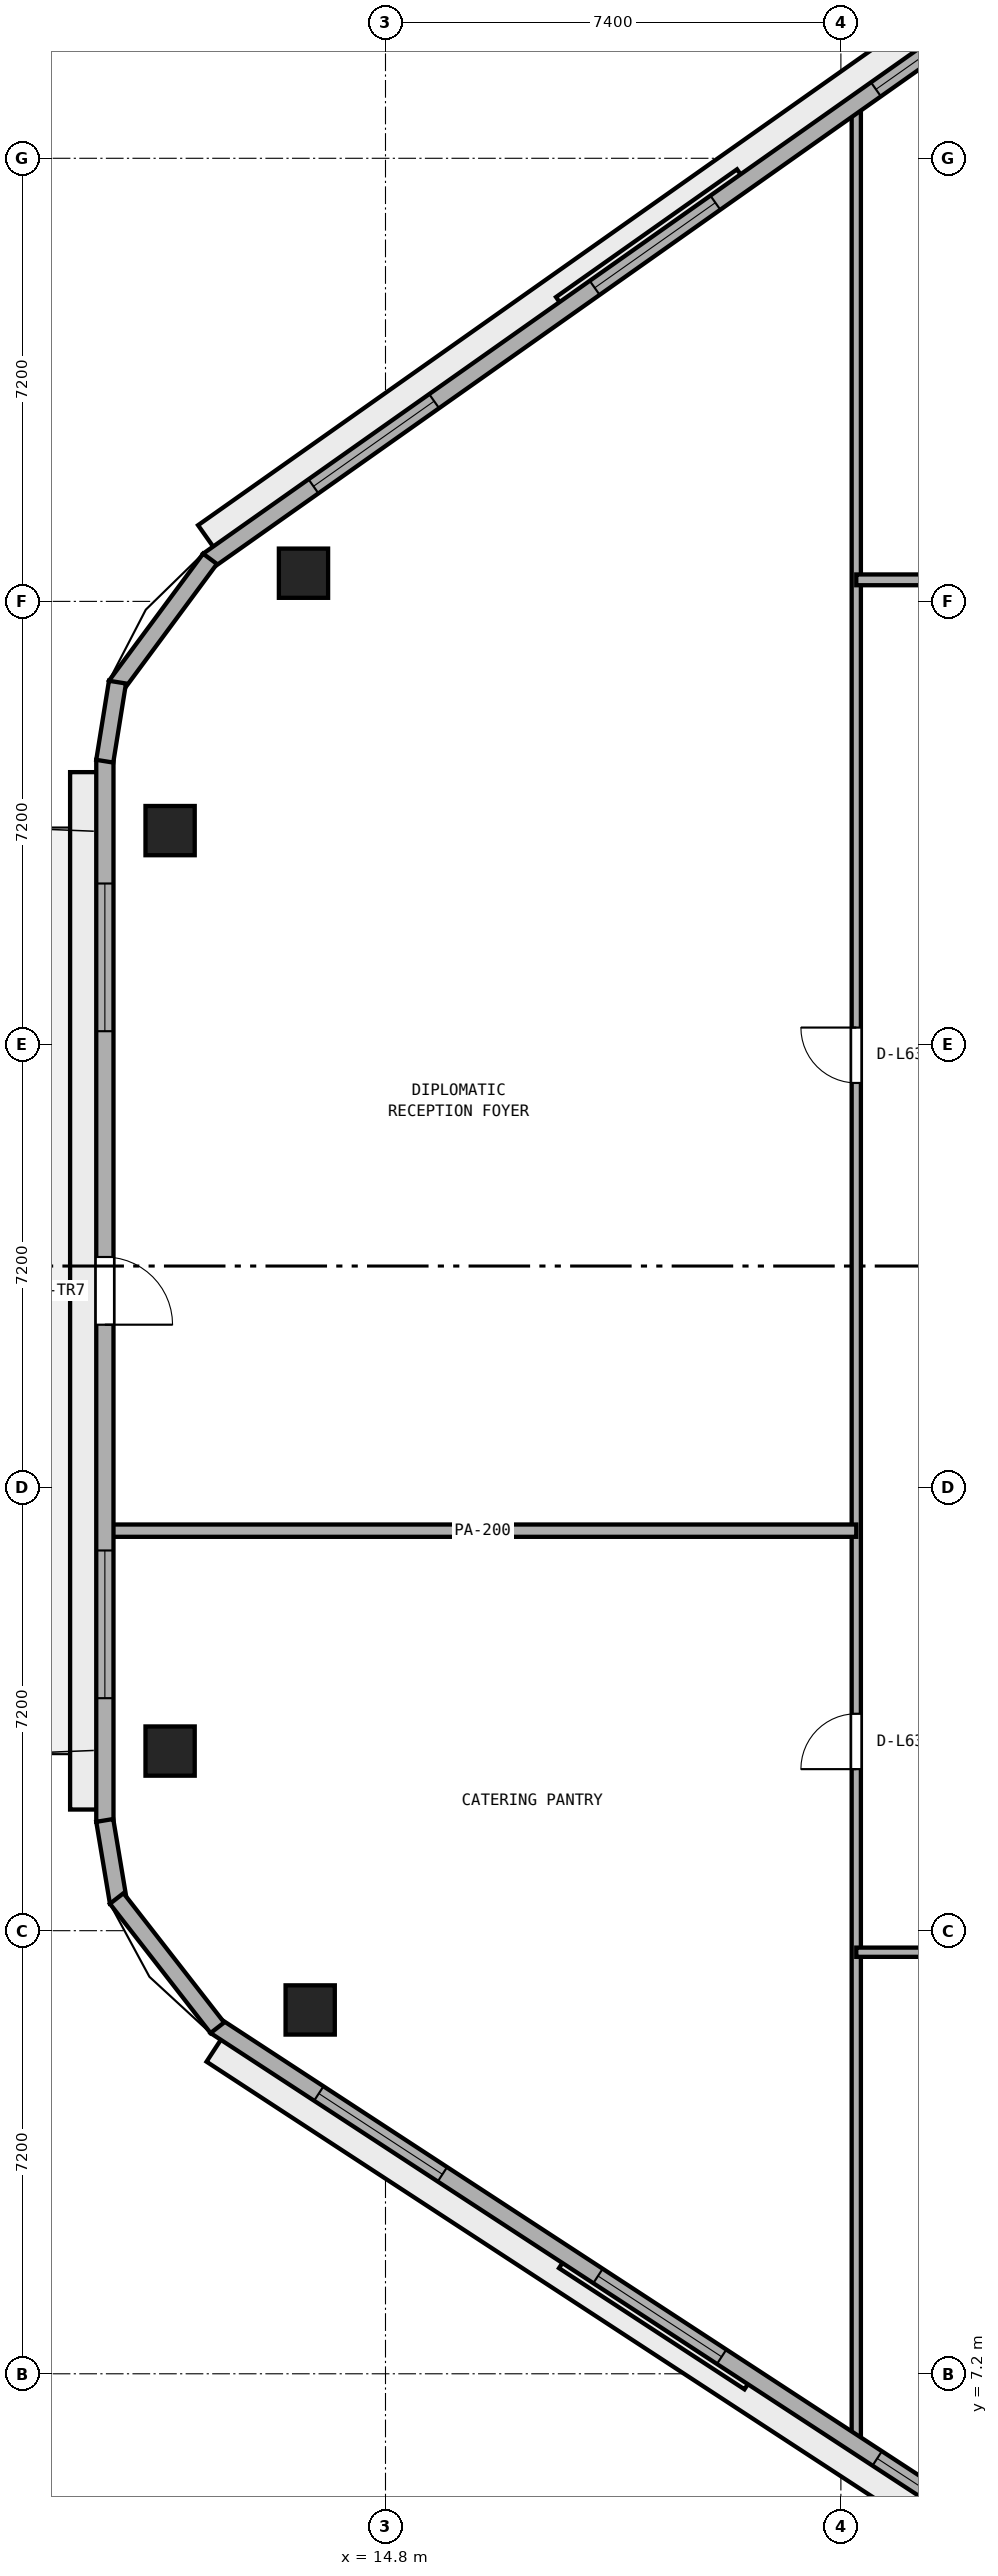
"""IFC4 building model, lengths in metres.
Left out: names, types, materials, properties, quantities, classifications, styles, units other than length and angle.
Written with IfcOpenShell. Run it as: python <this file> out.ifc"""

import sys

from ifc_helpers import new_model, si_unit, direction, frame, frame_2d, origin, origin_2d, place, context, subcontext, project, spatial, rectangle, extrude, element, fill, save


model = new_model("IFC4")
c1 = context("Model", 3, precision=1e-05, world=origin(), true_north=direction((0.0, 1.0)))
c2 = subcontext(c1, "Body", "Model", "MODEL_VIEW")
j1 = project(units=[si_unit("LENGTHUNIT", "METRE"), si_unit("PLANEANGLEUNIT", "RADIAN")], contexts=[c1])
p1 = place(None, origin())
s1 = spatial("IfcSite", under=j1, at=p1, CompositionType="ELEMENT")
p2 = place(p1, origin())
s2 = spatial("IfcBuilding", under=s1, at=p2, CompositionType="ELEMENT")
p3 = place(p2, frame((0.0, 0.0, 247.8)))
s3 = spatial("IfcBuildingStorey", under=s2, at=p3, CompositionType="ELEMENT", Elevation=247.8)
for number, where, z_axis, x_axis in (
    (1, (13.467, 36.458, 0.0), (0.0, 0.0, 1.0), (1.0, 0.0, 0.0)),
    (2, (11.3, 32.275, 0.0), (0.0, 0.0, 1.0), (1.0, 0.0, 0.0)),
    (3, (11.3, 17.319, 0.0), (0.0, 0.0, 1.0), (1.0, 0.0, 0.0)),
    (4, (13.576, 13.112, 0.0), (0.0, 0.0, 1.0), (1.0, 0.0, 0.0)),
):
    element("IfcColumn", number, at=place(p3, frame(where, z_axis=z_axis, x_axis=x_axis)), inside=s3, PredefinedType="COLUMN", context=c2, shape_type="SweptSolid", body=[
        extrude(rectangle(XDim=0.8, YDim=0.8, at=origin_2d()), origin(), (0.0, 0.0, 1.0), 3.8),
    ])
p4 = place(p3, frame((22.45, 6.02, 0.0), z_axis=(0.0, 0.0, 1.0), x_axis=(0.0, 1.0, 0.0)))
e5 = element("IfcWall", 5, at=p4, inside=s3, PredefinedType="PARTITIONING", context=c2, shape_type="SweptSolid", body=[
    extrude(rectangle(XDim=38.106, YDim=0.15, at=frame_2d((19.053, 0.0))), origin(), (0.0, 0.0, 1.0), 3.51),
])
p5 = place(p4, frame((11.005, 0.0, 0.0)))
e6 = element("IfcOpeningElement", 6, at=p5, cuts=e5, PredefinedType="OPENING", context=c2, shape_type="SweptSolid", body=[
    extrude(rectangle(XDim=0.9, YDim=2.1, at=frame_2d((0.45, 1.05))), frame((0.0, 0.085, 0.0), z_axis=(0.0, -1.0, 0.0), x_axis=(1.0, 0.0, 0.0)), (0.0, 0.0, 1.0), 0.17),
])
p6 = place(p4, frame((22.155, 0.0, 0.0)))
e7 = element("IfcOpeningElement", 7, at=p6, cuts=e5, PredefinedType="OPENING", context=c2, shape_type="SweptSolid", body=[
    extrude(rectangle(XDim=0.9, YDim=2.1, at=frame_2d((0.45, 1.05))), frame((0.0, 0.085, 0.0), z_axis=(0.0, -1.0, 0.0), x_axis=(1.0, 0.0, 0.0)), (0.0, 0.0, 1.0), 0.17),
])
p7 = place(p3, frame((22.45, 14.05, 0.0), z_axis=(0.0, 0.0, 1.0), x_axis=(1.0, 0.0, 0.0)))
e8 = element("IfcWall", 8, at=p7, inside=s3, PredefinedType="PARTITIONING", context=c2, shape_type="SweptSolid", body=[
    extrude(rectangle(XDim=13.2, YDim=0.15, at=frame_2d((6.6, 0.0))), origin(), (0.0, 0.0, 1.0), 3.51),
])
p8 = place(p7, frame((6.15, 0.0, 0.0)))
e9 = element("IfcOpeningElement", 9, at=p8, cuts=e8, PredefinedType="OPENING", context=c2, shape_type="SweptSolid", body=[
    extrude(rectangle(XDim=0.9, YDim=2.1, at=frame_2d((0.45, 1.05))), frame((0.0, 0.085, 0.0), z_axis=(0.0, -1.0, 0.0), x_axis=(1.0, 0.0, 0.0)), (0.0, 0.0, 1.0), 0.17),
])
p9 = place(p3, frame((10.305, 20.9, 0.0), z_axis=(0.0, 0.0, 1.0), x_axis=(1.0, 0.0, 0.0)))
e10 = element("IfcWall", 10, at=p9, inside=s3, PredefinedType="PARTITIONING", context=c2, shape_type="SweptSolid", body=[
    extrude(rectangle(XDim=12.145, YDim=0.2, at=frame_2d((6.073, 0.0))), origin(), (0.0, 0.0, 1.0), 3.51),
])
p10 = place(p3, frame((22.45, 36.35, 0.0), z_axis=(0.0, 0.0, 1.0), x_axis=(1.0, 0.0, 0.0)))
e11 = element("IfcWall", 11, at=p10, inside=s3, PredefinedType="PARTITIONING", context=c2, shape_type="SweptSolid", body=[
    extrude(rectangle(XDim=26.15, YDim=0.175, at=frame_2d((13.075, 0.0))), origin(), (0.0, 0.0, 1.0), 3.51),
])
p11 = place(p10, frame((12.575, 0.0, 0.0)))
e12 = element("IfcOpeningElement", 12, at=p11, cuts=e11, PredefinedType="OPENING", context=c2, shape_type="SweptSolid", body=[
    extrude(rectangle(XDim=1.0, YDim=2.12, at=frame_2d((0.5, 1.06))), frame((0.0, 0.097, 0.0), z_axis=(0.0, -1.0, 0.0), x_axis=(1.0, 0.0, 0.0)), (0.0, 0.0, 1.0), 0.195),
])
p12 = place(p3, frame((26.443, 46.913, 0.0), z_axis=(0.0, 0.0, 1.0), x_axis=(-0.817024179766, -0.576603407619, 0.0)))
e13 = element("IfcWall", 13, at=p12, inside=s3, PredefinedType="STANDARD", context=c2, shape_type="SweptSolid", body=[
    extrude(rectangle(XDim=17.78, YDim=0.28, at=frame_2d((8.89, 0.0))), origin(), (0.0, 0.0, 1.0), 3.51),
])
p13 = place(p12, frame((2.097, 0.0, 0.9)))
e14 = element("IfcOpeningElement", 14, at=p13, cuts=e13, PredefinedType="OPENING", context=c2, shape_type="SweptSolid", body=[
    extrude(rectangle(XDim=2.4, YDim=1.75, at=frame_2d((1.2, 0.875))), frame((0.0, 0.15, 0.0), z_axis=(0.0, -1.0, 0.0), x_axis=(1.0, 0.0, 0.0)), (0.0, 0.0, 1.0), 0.3),
])
p14 = place(p12, frame((7.69, 0.0, 0.9)))
e15 = element("IfcOpeningElement", 15, at=p14, cuts=e13, PredefinedType="OPENING", context=c2, shape_type="SweptSolid", body=[
    extrude(rectangle(XDim=2.4, YDim=1.75, at=frame_2d((1.2, 0.875))), frame((0.0, 0.15, 0.0), z_axis=(0.0, -1.0, 0.0), x_axis=(1.0, 0.0, 0.0)), (0.0, 0.0, 1.0), 0.3),
])
p15 = place(p12, frame((13.283, 0.0, 0.9)))
e16 = element("IfcOpeningElement", 16, at=p15, cuts=e13, PredefinedType="OPENING", context=c2, shape_type="SweptSolid", body=[
    extrude(rectangle(XDim=2.4, YDim=1.75, at=frame_2d((1.2, 0.875))), frame((0.0, 0.15, 0.0), z_axis=(0.0, -1.0, 0.0), x_axis=(1.0, 0.0, 0.0)), (0.0, 0.0, 1.0), 0.3),
])
p16 = place(p3, frame((10.24, 33.425, 0.0), z_axis=(0.0, 0.0, 1.0), x_axis=(0.0, -1.0, 0.0)))
e17 = element("IfcWall", 17, at=p16, inside=s3, PredefinedType="STANDARD", context=c2, shape_type="SweptSolid", body=[
    extrude(rectangle(XDim=17.257, YDim=0.28, at=frame_2d((8.628, 0.0))), origin(), (0.0, 0.0, 1.0), 3.51),
])
p17 = place(p16, frame((8.078, 0.0, 0.0)))
e18 = element("IfcOpeningElement", 18, at=p17, cuts=e17, PredefinedType="OPENING", context=c2, shape_type="SweptSolid", body=[
    extrude(rectangle(XDim=1.1, YDim=2.2, at=frame_2d((0.55, 1.1))), frame((0.0, 0.15, 0.0), z_axis=(0.0, -1.0, 0.0), x_axis=(1.0, 0.0, 0.0)), (0.0, 0.0, 1.0), 0.3),
])
p18 = place(p16, frame((2.01, 0.0, 0.9)))
e19 = element("IfcOpeningElement", 19, at=p18, cuts=e17, PredefinedType="OPENING", context=c2, shape_type="SweptSolid", body=[
    extrude(rectangle(XDim=2.4, YDim=1.75, at=frame_2d((1.2, 0.875))), frame((0.0, 0.15, 0.0), z_axis=(0.0, -1.0, 0.0), x_axis=(1.0, 0.0, 0.0)), (0.0, 0.0, 1.0), 0.3),
])
p19 = place(p16, frame((12.847, 0.0, 0.9)))
e20 = element("IfcOpeningElement", 20, at=p19, cuts=e17, PredefinedType="OPENING", context=c2, shape_type="SweptSolid", body=[
    extrude(rectangle(XDim=2.4, YDim=1.75, at=frame_2d((1.2, 0.875))), frame((0.0, 0.15, 0.0), z_axis=(0.0, -1.0, 0.0), x_axis=(1.0, 0.0, 0.0)), (0.0, 0.0, 1.0), 0.3),
])
p20 = place(p3, frame((12.034, 12.854, 0.0), z_axis=(0.0, 0.0, 1.0), x_axis=(0.837118352984, -0.547021812269, 0.0)))
e21 = element("IfcWall", 21, at=p20, inside=s3, PredefinedType="STANDARD", context=c2, shape_type="SweptSolid", body=[
    extrude(rectangle(XDim=17.259, YDim=0.28, at=frame_2d((8.63, 0.0))), origin(), (0.0, 0.0, 1.0), 3.51),
])
p21 = place(p20, frame((2.01, 0.0, 0.9)))
e22 = element("IfcOpeningElement", 22, at=p21, cuts=e21, PredefinedType="OPENING", context=c2, shape_type="SweptSolid", body=[
    extrude(rectangle(XDim=2.4, YDim=1.75, at=frame_2d((1.2, 0.875))), frame((0.0, 0.15, 0.0), z_axis=(0.0, -1.0, 0.0), x_axis=(1.0, 0.0, 0.0)), (0.0, 0.0, 1.0), 0.3),
])
p22 = place(p20, frame((7.43, 0.0, 0.9)))
e23 = element("IfcOpeningElement", 23, at=p22, cuts=e21, PredefinedType="OPENING", context=c2, shape_type="SweptSolid", body=[
    extrude(rectangle(XDim=2.4, YDim=1.75, at=frame_2d((1.2, 0.875))), frame((0.0, 0.15, 0.0), z_axis=(0.0, -1.0, 0.0), x_axis=(1.0, 0.0, 0.0)), (0.0, 0.0, 1.0), 0.3),
])
p23 = place(p20, frame((12.849, 0.0, 0.9)))
e24 = element("IfcOpeningElement", 24, at=p23, cuts=e21, PredefinedType="OPENING", context=c2, shape_type="SweptSolid", body=[
    extrude(rectangle(XDim=2.4, YDim=1.75, at=frame_2d((1.2, 0.875))), frame((0.0, 0.15, 0.0), z_axis=(0.0, -1.0, 0.0), x_axis=(1.0, 0.0, 0.0)), (0.0, 0.0, 1.0), 0.3),
])
p24 = place(p3, frame((11.948, 36.692, 0.0), z_axis=(0.0, 0.0, 1.0), x_axis=(-0.595170751493, -0.803599263668, 0.0)))
e25 = element("IfcWall", 25, at=p24, inside=s3, PredefinedType="STANDARD", context=c2, shape_type="SweptSolid", body=[
    extrude(rectangle(XDim=2.57, YDim=0.28, at=frame_2d((1.285, 0.0))), origin(), (0.0, 0.0, 1.0), 3.51),
])
p25 = place(p3, frame((10.445, 34.688, 0.0), z_axis=(0.0, 0.0, 1.0), x_axis=(-0.158524605336, -0.987355027081, 0.0)))
e26 = element("IfcWall", 26, at=p25, inside=s3, PredefinedType="STANDARD", context=c2, shape_type="SweptSolid", body=[
    extrude(rectangle(XDim=1.301, YDim=0.28, at=frame_2d((0.651, 0.0))), origin(), (0.0, 0.0, 1.0), 3.51),
])
p26 = place(p3, frame((10.238, 16.192, 0.0), z_axis=(0.0, 0.0, 1.0), x_axis=(0.164604311367, -0.986359681191, 0.0)))
e27 = element("IfcWall", 27, at=p26, inside=s3, PredefinedType="STANDARD", context=c2, shape_type="SweptSolid", body=[
    extrude(rectangle(XDim=1.35, YDim=0.28, at=frame_2d((0.675, 0.0))), origin(), (0.0, 0.0, 1.0), 3.51),
])
p27 = place(p3, frame((10.433, 14.923, 0.0), z_axis=(0.0, 0.0, 1.0), x_axis=(0.614181852676, -0.78916452774, 0.0)))
e28 = element("IfcWall", 28, at=p27, inside=s3, PredefinedType="STANDARD", context=c2, shape_type="SweptSolid", body=[
    extrude(rectangle(XDim=2.662, YDim=0.28, at=frame_2d((1.331, 0.0))), origin(), (0.0, 0.0, 1.0), 3.51),
])
p28 = place(p5, origin())
e29 = element("IfcDoor", 29, at=p28, inside=s3, OperationType="SINGLE_SWING_LEFT", PredefinedType="DOOR", context=c2, shape_type="SweptSolid", body=[
    extrude(rectangle(XDim=0.9, YDim=2.1, at=frame_2d((0.45, 1.05))), frame((0.0, 0.025, 0.0), z_axis=(0.0, -1.0, 0.0), x_axis=(1.0, 0.0, 0.0)), (0.0, 0.0, 1.0), 0.05),
])
fill(e6, e29)
p29 = place(p6, origin())
e30 = element("IfcDoor", 30, at=p29, inside=s3, OperationType="SINGLE_SWING_RIGHT", PredefinedType="DOOR", context=c2, shape_type="SweptSolid", body=[
    extrude(rectangle(XDim=0.9, YDim=2.1, at=frame_2d((0.45, 1.05))), frame((0.0, 0.025, 0.0), z_axis=(0.0, -1.0, 0.0), x_axis=(1.0, 0.0, 0.0)), (0.0, 0.0, 1.0), 0.05),
])
fill(e7, e30)
p30 = place(p13, origin())
e31 = element("IfcWindow", 31, at=p30, inside=s3, PartitioningType="SINGLE_PANEL", PredefinedType="WINDOW", context=c2, shape_type="SweptSolid", body=[
    extrude(rectangle(XDim=2.4, YDim=1.75, at=frame_2d((1.2, 0.875))), frame((0.0, 0.03, 0.0), z_axis=(0.0, -1.0, 0.0), x_axis=(1.0, 0.0, 0.0)), (0.0, 0.0, 1.0), 0.06),
])
fill(e14, e31)
p31 = place(p14, origin())
e32 = element("IfcWindow", 32, at=p31, inside=s3, PartitioningType="SINGLE_PANEL", PredefinedType="WINDOW", context=c2, shape_type="SweptSolid", body=[
    extrude(rectangle(XDim=2.4, YDim=1.75, at=frame_2d((1.2, 0.875))), frame((0.0, 0.03, 0.0), z_axis=(0.0, -1.0, 0.0), x_axis=(1.0, 0.0, 0.0)), (0.0, 0.0, 1.0), 0.06),
])
fill(e15, e32)
p32 = place(p15, origin())
e33 = element("IfcWindow", 33, at=p32, inside=s3, PartitioningType="SINGLE_PANEL", PredefinedType="WINDOW", context=c2, shape_type="SweptSolid", body=[
    extrude(rectangle(XDim=2.4, YDim=1.75, at=frame_2d((1.2, 0.875))), frame((0.0, 0.03, 0.0), z_axis=(0.0, -1.0, 0.0), x_axis=(1.0, 0.0, 0.0)), (0.0, 0.0, 1.0), 0.06),
])
fill(e16, e33)
p33 = place(p17, origin())
e34 = element("IfcDoor", 34, at=p33, inside=s3, OperationType="SINGLE_SWING_RIGHT", PredefinedType="DOOR", context=c2, shape_type="SweptSolid", body=[
    extrude(rectangle(XDim=1.1, YDim=2.2, at=frame_2d((0.55, 1.1))), frame((0.0, 0.025, 0.0), z_axis=(0.0, -1.0, 0.0), x_axis=(1.0, 0.0, 0.0)), (0.0, 0.0, 1.0), 0.05),
])
fill(e18, e34)
p34 = place(p18, origin())
e35 = element("IfcWindow", 35, at=p34, inside=s3, PartitioningType="SINGLE_PANEL", PredefinedType="WINDOW", context=c2, shape_type="SweptSolid", body=[
    extrude(rectangle(XDim=2.4, YDim=1.75, at=frame_2d((1.2, 0.875))), frame((0.0, 0.03, 0.0), z_axis=(0.0, -1.0, 0.0), x_axis=(1.0, 0.0, 0.0)), (0.0, 0.0, 1.0), 0.06),
])
fill(e19, e35)
p35 = place(p19, origin())
e36 = element("IfcWindow", 36, at=p35, inside=s3, PartitioningType="SINGLE_PANEL", PredefinedType="WINDOW", context=c2, shape_type="SweptSolid", body=[
    extrude(rectangle(XDim=2.4, YDim=1.75, at=frame_2d((1.2, 0.875))), frame((0.0, 0.03, 0.0), z_axis=(0.0, -1.0, 0.0), x_axis=(1.0, 0.0, 0.0)), (0.0, 0.0, 1.0), 0.06),
])
fill(e20, e36)
p36 = place(p21, origin())
e37 = element("IfcWindow", 37, at=p36, inside=s3, PartitioningType="SINGLE_PANEL", PredefinedType="WINDOW", context=c2, shape_type="SweptSolid", body=[
    extrude(rectangle(XDim=2.4, YDim=1.75, at=frame_2d((1.2, 0.875))), frame((0.0, 0.03, 0.0), z_axis=(0.0, -1.0, 0.0), x_axis=(1.0, 0.0, 0.0)), (0.0, 0.0, 1.0), 0.06),
])
fill(e22, e37)
p37 = place(p22, origin())
e38 = element("IfcWindow", 38, at=p37, inside=s3, PartitioningType="SINGLE_PANEL", PredefinedType="WINDOW", context=c2, shape_type="SweptSolid", body=[
    extrude(rectangle(XDim=2.4, YDim=1.75, at=frame_2d((1.2, 0.875))), frame((0.0, 0.03, 0.0), z_axis=(0.0, -1.0, 0.0), x_axis=(1.0, 0.0, 0.0)), (0.0, 0.0, 1.0), 0.06),
])
fill(e23, e38)
p38 = place(p23, origin())
e39 = element("IfcWindow", 39, at=p38, inside=s3, PartitioningType="SINGLE_PANEL", PredefinedType="WINDOW", context=c2, shape_type="SweptSolid", body=[
    extrude(rectangle(XDim=2.4, YDim=1.75, at=frame_2d((1.2, 0.875))), frame((0.0, 0.03, 0.0), z_axis=(0.0, -1.0, 0.0), x_axis=(1.0, 0.0, 0.0)), (0.0, 0.0, 1.0), 0.06),
])
fill(e24, e39)
save(model, sys.argv[1])
